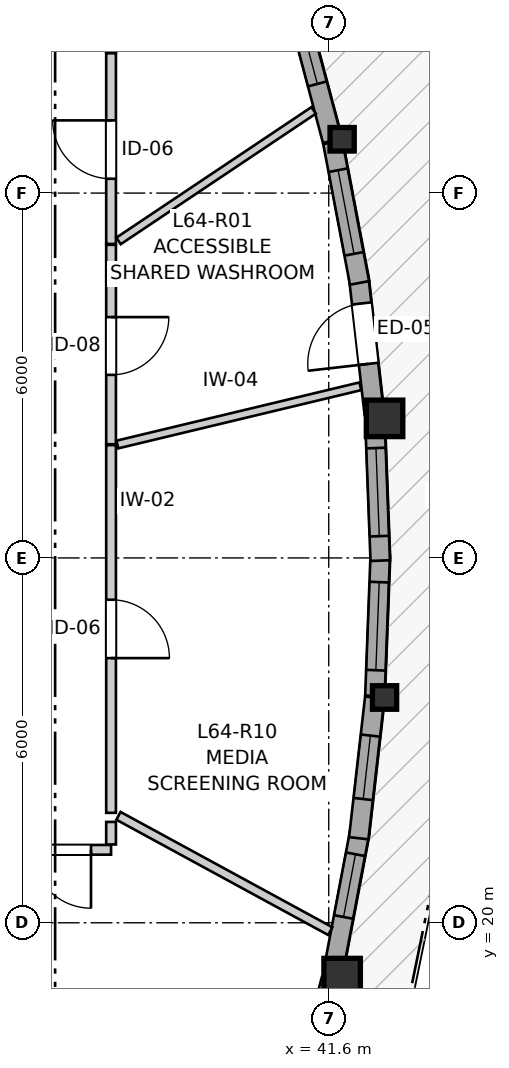
"""IFC4 building model, lengths in metres.
Left out: names, types, materials, properties, quantities, classifications, styles, units other than length and angle.
Written with IfcOpenShell. Run it as: python <this file> out.ifc"""

import sys

from ifc_helpers import new_model, si_unit, direction, frame, frame_2d, origin, origin_2d, place, context, subcontext, project, spatial, rectangle, i_section, extrude, source, transform, mapped, element, fill, save


model = new_model("IFC4")
c1 = context("Model", 3, precision=1e-05, world=origin(), true_north=direction((0.0, 1.0)))
c2 = subcontext(c1, "Body", "Model", "MODEL_VIEW")
j1 = project(units=[si_unit("LENGTHUNIT", "METRE"), si_unit("PLANEANGLEUNIT", "RADIAN")], contexts=[c1])
p1 = place(None, origin())
s1 = spatial("IfcSite", under=j1, at=p1, CompositionType="ELEMENT")
p2 = place(p1, origin())
s2 = spatial("IfcBuilding", under=s1, at=p2, CompositionType="ELEMENT")
p3 = place(p2, frame((0.0, 0.0, 214.8)))
s3 = spatial("IfcBuildingStorey", under=s2, at=p3, CompositionType="ELEMENT", Elevation=214.8)
m1 = source(origin(), c2, "Body", "SweptSolid", [
    extrude(rectangle(XDim=0.6, YDim=0.6, at=origin_2d()), origin(), (0.0, 0.0, 1.0), 2.96),
])
p4 = place(p3, frame((41.82, 19.115, 0.0), z_axis=(0.0, 0.0, 1.0), x_axis=(1.0, 0.0, 0.0)))
e1 = element("IfcColumn", 1, at=p4, inside=s3, PredefinedType="COLUMN", context=c2, shape_type="MappedRepresentation", body=[
    mapped(m1, transform((0.0, 0.0, 0.0), x_axis=(1.0, 0.0, 0.0), y_axis=(0.0, 1.0, 0.0), z_axis=(0.0, 0.0, 1.0), scale=1.0)),
])
m2 = source(origin(), c2, "Body", "SweptSolid", [
    extrude(i_section(OverallWidth=0.398, OverallDepth=0.387, WebThickness=0.019, FlangeThickness=0.03, FilletRadius=0.015, at=origin_2d()), origin(), (0.0, 0.0, 1.0), 2.96),
])
p5 = place(p3, frame((42.518, 23.705, 0.0), z_axis=(0.0, 0.0, 1.0), x_axis=(1.0, 0.0, 0.0)))
e2 = element("IfcColumn", 2, at=p5, inside=s3, PredefinedType="PILASTER", context=c2, shape_type="MappedRepresentation", body=[
    mapped(m2, transform((0.0, 0.0, 0.0), x_axis=(1.0, 0.0, 0.0), y_axis=(0.0, 1.0, 0.0), z_axis=(0.0, 0.0, 1.0), scale=1.0)),
])
p6 = place(p3, frame((42.518, 28.295, 0.0), z_axis=(0.0, 0.0, 1.0), x_axis=(1.0, 0.0, 0.0)))
e3 = element("IfcColumn", 3, at=p6, inside=s3, PredefinedType="COLUMN", context=c2, shape_type="MappedRepresentation", body=[
    mapped(m1, transform((0.0, 0.0, 0.0), x_axis=(1.0, 0.0, 0.0), y_axis=(0.0, 1.0, 0.0), z_axis=(0.0, 0.0, 1.0), scale=1.0)),
])
p7 = place(p3, frame((41.82, 32.885, 0.0), z_axis=(0.0, 0.0, 1.0), x_axis=(1.0, 0.0, 0.0)))
e4 = element("IfcColumn", 4, at=p7, inside=s3, PredefinedType="PILASTER", context=c2, shape_type="MappedRepresentation", body=[
    mapped(m2, transform((0.0, 0.0, 0.0), x_axis=(1.0, 0.0, 0.0), y_axis=(0.0, 1.0, 0.0), z_axis=(0.0, 0.0, 1.0), scale=1.0)),
])
p8 = place(p3, frame((41.045, 16.824, 0.0), z_axis=(0.0, 0.0, 1.0), x_axis=(0.257099982868, 0.966384808867, 0.0)))
e5 = element("IfcWall", 5, at=p8, inside=s3, PredefinedType="SOLIDWALL", context=c2, shape_type="SweptSolid", body=[
    extrude(rectangle(XDim=2.323, YDim=0.32, at=frame_2d((1.161, 0.0))), origin(), (0.0, 0.0, 1.0), 2.58),
])
p9 = place(p8, frame((0.491, 0.0, 0.82)))
e6 = element("IfcOpeningElement", 6, at=p9, cuts=e5, PredefinedType="OPENING", context=c2, shape_type="SweptSolid", body=[
    extrude(rectangle(XDim=1.35, YDim=1.45, at=frame_2d((0.675, 0.725))), frame((0.0, 0.17, 0.0), z_axis=(0.0, -1.0, 0.0), x_axis=(1.0, 0.0, 0.0)), (0.0, 0.0, 1.0), 0.34),
])
p10 = place(p3, frame((41.68, 19.233, 0.0), z_axis=(0.0, 0.0, 1.0), x_axis=(0.186630727552, 0.982430135701, 0.0)))
e7 = element("IfcWall", 7, at=p10, inside=s3, PredefinedType="SOLIDWALL", context=c2, shape_type="SweptSolid", body=[
    extrude(rectangle(XDim=2.284, YDim=0.32, at=frame_2d((1.142, 0.0))), origin(), (0.0, 0.0, 1.0), 2.58),
])
p11 = place(p10, frame((0.878, 0.0, 0.82)))
e8 = element("IfcOpeningElement", 8, at=p11, cuts=e7, PredefinedType="OPENING", context=c2, shape_type="SweptSolid", body=[
    extrude(rectangle(XDim=1.05, YDim=1.45, at=frame_2d((0.525, 0.725))), frame((0.0, 0.17, 0.0), z_axis=(0.0, -1.0, 0.0), x_axis=(1.0, 0.0, 0.0)), (0.0, 0.0, 1.0), 0.34),
])
p12 = place(p3, frame((42.093, 21.39, 0.0), z_axis=(0.0, 0.0, 1.0), x_axis=(0.113262644001, 0.993565082656, 0.0)))
e9 = element("IfcWall", 9, at=p12, inside=s3, PredefinedType="SOLIDWALL", context=c2, shape_type="SweptSolid", body=[
    extrude(rectangle(XDim=2.328, YDim=0.32, at=frame_2d((1.164, 0.0))), origin(), (0.0, 0.0, 1.0), 2.58),
])
p13 = place(p12, frame((0.649, 0.0, 0.82)))
e10 = element("IfcOpeningElement", 10, at=p13, cuts=e9, PredefinedType="OPENING", context=c2, shape_type="SweptSolid", body=[
    extrude(rectangle(XDim=1.05, YDim=1.45, at=frame_2d((0.525, 0.725))), frame((0.0, 0.17, 0.0), z_axis=(0.0, -1.0, 0.0), x_axis=(1.0, 0.0, 0.0)), (0.0, 0.0, 1.0), 0.34),
])
p14 = place(p3, frame((42.359, 23.731, 0.0), z_axis=(0.0, 0.0, 1.0), x_axis=(0.037975332386, 0.999278676912, 0.0)))
e11 = element("IfcWall", 11, at=p14, inside=s3, PredefinedType="SOLIDWALL", context=c2, shape_type="SweptSolid", body=[
    extrude(rectangle(XDim=2.314, YDim=0.32, at=frame_2d((1.157, 0.0))), origin(), (0.0, 0.0, 1.0), 2.58),
])
p15 = place(p14, frame((0.422, 0.0, 0.82)))
e12 = element("IfcOpeningElement", 12, at=p15, cuts=e11, PredefinedType="OPENING", context=c2, shape_type="SweptSolid", body=[
    extrude(rectangle(XDim=1.45, YDim=1.25, at=frame_2d((0.725, 0.625))), frame((0.0, 0.17, 0.0), z_axis=(0.0, -1.0, 0.0), x_axis=(1.0, 0.0, 0.0)), (0.0, 0.0, 1.0), 0.34),
])
p16 = place(p3, frame((42.447, 25.956, 0.0), z_axis=(0.0, 0.0, 1.0), x_axis=(-0.037961080573, 0.999279218418, 0.0)))
e13 = element("IfcWall", 13, at=p16, inside=s3, PredefinedType="SOLIDWALL", context=c2, shape_type="SweptSolid", body=[
    extrude(rectangle(XDim=2.245, YDim=0.32, at=frame_2d((1.122, 0.0))), origin(), (0.0, 0.0, 1.0), 2.58),
])
p17 = place(p16, frame((0.402, 0.0, 0.82)))
e14 = element("IfcOpeningElement", 14, at=p17, cuts=e13, PredefinedType="OPENING", context=c2, shape_type="SweptSolid", body=[
    extrude(rectangle(XDim=1.45, YDim=1.25, at=frame_2d((0.725, 0.625))), frame((0.0, 0.17, 0.0), z_axis=(0.0, -1.0, 0.0), x_axis=(1.0, 0.0, 0.0)), (0.0, 0.0, 1.0), 0.34),
])
p18 = place(p3, frame((42.349, 28.366, 0.0), z_axis=(0.0, 0.0, 1.0), x_axis=(-0.113314829757, 0.99355913229, 0.0)))
e15 = element("IfcWall", 15, at=p18, inside=s3, PredefinedType="SOLIDWALL", context=c2, shape_type="SweptSolid", body=[
    extrude(rectangle(XDim=2.258, YDim=0.32, at=frame_2d((1.129, 0.0))), origin(), (0.0, 0.0, 1.0), 2.58),
])
p19 = place(p18, frame((0.83, 0.0, 0.0)))
e16 = element("IfcOpeningElement", 16, at=p19, cuts=e15, PredefinedType="OPENING", context=c2, shape_type="SweptSolid", body=[
    extrude(rectangle(XDim=1.0, YDim=2.1, at=frame_2d((0.5, 1.05))), frame((0.0, 0.17, 0.0), z_axis=(0.0, -1.0, 0.0), x_axis=(1.0, 0.0, 0.0)), (0.0, 0.0, 1.0), 0.34),
])
p20 = place(p3, frame((42.106, 30.523, 0.0), z_axis=(0.0, 0.0, 1.0), x_axis=(-0.186673658051, 0.982421979289, 0.0)))
e17 = element("IfcWall", 17, at=p20, inside=s3, PredefinedType="SOLIDWALL", context=c2, shape_type="SweptSolid", body=[
    extrude(rectangle(XDim=2.354, YDim=0.32, at=frame_2d((1.177, 0.0))), origin(), (0.0, 0.0, 1.0), 2.58),
])
p21 = place(p20, frame((0.487, 0.0, 0.82)))
e18 = element("IfcOpeningElement", 18, at=p21, cuts=e17, PredefinedType="OPENING", context=c2, shape_type="SweptSolid", body=[
    extrude(rectangle(XDim=1.4, YDim=1.35, at=frame_2d((0.7, 0.675))), frame((0.0, 0.17, 0.0), z_axis=(0.0, -1.0, 0.0), x_axis=(1.0, 0.0, 0.0)), (0.0, 0.0, 1.0), 0.34),
])
p22 = place(p3, frame((41.66, 32.863, 0.0), z_axis=(0.0, 0.0, 1.0), x_axis=(-0.257008511659, 0.966409139513, 0.0)))
e19 = element("IfcWall", 19, at=p22, inside=s3, PredefinedType="SOLIDWALL", context=c2, shape_type="SweptSolid", body=[
    extrude(rectangle(XDim=2.393, YDim=0.32, at=frame_2d((1.196, 0.0))), origin(), (0.0, 0.0, 1.0), 2.58),
])
p23 = place(p22, frame((0.965, 0.0, 0.82)))
e20 = element("IfcOpeningElement", 20, at=p23, cuts=e19, PredefinedType="OPENING", context=c2, shape_type="SweptSolid", body=[
    extrude(rectangle(XDim=0.95, YDim=1.35, at=frame_2d((0.475, 0.675))), frame((0.0, 0.17, 0.0), z_axis=(0.0, -1.0, 0.0), x_axis=(1.0, 0.0, 0.0)), (0.0, 0.0, 1.0), 0.34),
])
p24 = place(p3, frame((38.02, 27.855, 0.0), z_axis=(0.0, 0.0, 1.0), x_axis=(0.0, -1.0, 0.0)))
e21 = element("IfcWall", 21, at=p24, inside=s3, PredefinedType="PARTITIONING", context=c2, shape_type="SweptSolid", body=[
    extrude(rectangle(XDim=6.047, YDim=0.16, at=frame_2d((3.023, 0.0))), origin(), (0.0, 0.0, 1.0), 2.96),
])
p25 = place(p24, frame((2.542, 0.0, 0.0)))
e22 = element("IfcOpeningElement", 22, at=p25, cuts=e21, PredefinedType="OPENING", context=c2, shape_type="SweptSolid", body=[
    extrude(rectangle(XDim=0.96, YDim=2.1, at=frame_2d((0.48, 1.05))), frame((0.0, 0.09, 0.0), z_axis=(0.0, -1.0, 0.0), x_axis=(1.0, 0.0, 0.0)), (0.0, 0.0, 1.0), 0.18),
])
p26 = place(p3, frame((38.02, 31.149, 0.0), z_axis=(0.0, 0.0, 1.0), x_axis=(0.0, -1.0, 0.0)))
e23 = element("IfcWall", 23, at=p26, inside=s3, PredefinedType="PARTITIONING", context=c2, shape_type="SweptSolid", body=[
    extrude(rectangle(XDim=3.279, YDim=0.16, at=frame_2d((1.639, 0.0))), origin(), (0.0, 0.0, 1.0), 2.628),
])
p27 = place(p26, frame((1.188, 0.0, 0.0)))
e24 = element("IfcOpeningElement", 24, at=p27, cuts=e23, PredefinedType="OPENING", context=c2, shape_type="SweptSolid", body=[
    extrude(rectangle(XDim=0.95, YDim=2.1, at=frame_2d((0.475, 1.05))), frame((0.0, 0.09, 0.0), z_axis=(0.0, -1.0, 0.0), x_axis=(1.0, 0.0, 0.0)), (0.0, 0.0, 1.0), 0.18),
])
p28 = place(p3, frame((38.02, 31.164, 0.0), z_axis=(0.0, 0.0, 1.0), x_axis=(0.0, 1.0, 0.0)))
e25 = element("IfcWall", 25, at=p28, inside=s3, PredefinedType="PARTITIONING", context=c2, shape_type="SweptSolid", body=[
    extrude(rectangle(XDim=3.136, YDim=0.16, at=frame_2d((1.568, 0.0))), origin(), (0.0, 0.0, 1.0), 2.628),
])
p29 = place(p28, frame((1.072, 0.0, 0.0)))
e26 = element("IfcOpeningElement", 26, at=p29, cuts=e25, PredefinedType="OPENING", context=c2, shape_type="SweptSolid", body=[
    extrude(rectangle(XDim=0.96, YDim=2.1, at=frame_2d((0.48, 1.05))), frame((0.0, 0.09, 0.0), z_axis=(0.0, -1.0, 0.0), x_axis=(1.0, 0.0, 0.0)), (0.0, 0.0, 1.0), 0.18),
])
p30 = place(p3, frame((38.02, 21.2, 0.0), z_axis=(0.0, 0.0, 1.0), x_axis=(-1.0, 0.0, 0.0)))
e27 = element("IfcWall", 27, at=p30, inside=s3, PredefinedType="PARTITIONING", context=c2, shape_type="SweptSolid", body=[
    extrude(rectangle(XDim=1.612, YDim=0.16, at=frame_2d((0.806, 0.0))), origin(), (0.0, 0.0, 1.0), 2.96),
])
p31 = place(p30, frame((0.33, 0.0, 0.0)))
e28 = element("IfcOpeningElement", 28, at=p31, cuts=e27, PredefinedType="OPENING", context=c2, shape_type="SweptSolid", body=[
    extrude(rectangle(XDim=0.96, YDim=2.1, at=frame_2d((0.48, 1.05))), frame((0.0, 0.09, 0.0), z_axis=(0.0, -1.0, 0.0), x_axis=(1.0, 0.0, 0.0)), (0.0, 0.0, 1.0), 0.18),
])
p32 = place(p3, frame((38.123, 27.865, 0.0), z_axis=(0.0, 0.0, 1.0), x_axis=(0.972444961782, 0.233132572379, 0.0)))
e29 = element("IfcWall", 29, at=p32, inside=s3, PredefinedType="PARTITIONING", context=c2, shape_type="SweptSolid", body=[
    extrude(rectangle(XDim=4.11, YDim=0.13, at=frame_2d((2.055, 0.0))), origin(), (0.0, 0.0, 1.0), 2.96),
])
p33 = place(p3, frame((38.142, 21.759, 0.0), z_axis=(0.0, 0.0, 1.0), x_axis=(0.878323390095, -0.478066964359, 0.0)))
e30 = element("IfcWall", 30, at=p33, inside=s3, PredefinedType="PARTITIONING", context=c2, shape_type="SweptSolid", body=[
    extrude(rectangle(XDim=3.966, YDim=0.145, at=frame_2d((1.983, 0.0))), origin(), (0.0, 0.0, 1.0), 2.96),
])
p34 = place(p3, frame((38.143, 31.213, 0.0), z_axis=(0.0, 0.0, 1.0), x_axis=(0.831154063558, 0.556042195009, 0.0)))
e31 = element("IfcWall", 31, at=p34, inside=s3, PredefinedType="PARTITIONING", context=c2, shape_type="SweptSolid", body=[
    extrude(rectangle(XDim=3.86, YDim=0.13, at=frame_2d((1.93, 0.0))), origin(), (0.0, 0.0, 1.0), 2.96),
])
p35 = place(p3, frame((38.02, 21.288, 0.0), z_axis=(0.0, 0.0, 1.0), x_axis=(0.0, 1.0, 0.0)))
e32 = element("IfcWall", 32, at=p35, inside=s3, PredefinedType="PARTITIONING", context=c2, shape_type="SweptSolid", body=[
    extrude(rectangle(XDim=0.371, YDim=0.16, at=frame_2d((0.186, 0.0))), origin(), (0.0, 0.0, 1.0), 2.96),
])
m3 = source(origin(), c2, "Body", "SweptSolid", [
    extrude(rectangle(XDim=1.05, YDim=1.45, at=frame_2d((0.525, 0.725))), frame((0.0, 0.03, 0.0), z_axis=(0.0, -1.0, 0.0), x_axis=(1.0, 0.0, 0.0)), (0.0, 0.0, 1.0), 0.06),
])
p36 = place(p11, origin())
e33 = element("IfcWindow", 33, at=p36, inside=s3, PartitioningType="SINGLE_PANEL", PredefinedType="WINDOW", context=c2, shape_type="MappedRepresentation", body=[
    mapped(m3, transform((0.0, 0.0, 0.0), x_axis=(1.0, 0.0, 0.0), y_axis=(0.0, 1.0, 0.0), z_axis=(0.0, 0.0, 1.0), scale=1.0)),
])
fill(e8, e33)
p37 = place(p13, origin())
e34 = element("IfcWindow", 34, at=p37, inside=s3, PartitioningType="SINGLE_PANEL", PredefinedType="WINDOW", context=c2, shape_type="MappedRepresentation", body=[
    mapped(m3, transform((0.0, 0.0, 0.0), x_axis=(1.0, 0.0, 0.0), y_axis=(0.0, 1.0, 0.0), z_axis=(0.0, 0.0, 1.0), scale=1.0)),
])
fill(e10, e34)
m4 = source(origin(), c2, "Body", "SweptSolid", [
    extrude(rectangle(XDim=1.45, YDim=1.25, at=frame_2d((0.725, 0.625))), frame((0.0, 0.03, 0.0), z_axis=(0.0, -1.0, 0.0), x_axis=(1.0, 0.0, 0.0)), (0.0, 0.0, 1.0), 0.06),
])
p38 = place(p15, origin())
e35 = element("IfcWindow", 35, at=p38, inside=s3, PartitioningType="SINGLE_PANEL", PredefinedType="WINDOW", context=c2, shape_type="MappedRepresentation", body=[
    mapped(m4, transform((0.0, 0.0, 0.0), x_axis=(1.0, 0.0, 0.0), y_axis=(0.0, 1.0, 0.0), z_axis=(0.0, 0.0, 1.0), scale=1.0)),
])
fill(e12, e35)
p39 = place(p17, origin())
e36 = element("IfcWindow", 36, at=p39, inside=s3, PartitioningType="SINGLE_PANEL", PredefinedType="WINDOW", context=c2, shape_type="MappedRepresentation", body=[
    mapped(m4, transform((0.0, 0.0, 0.0), x_axis=(1.0, 0.0, 0.0), y_axis=(0.0, 1.0, 0.0), z_axis=(0.0, 0.0, 1.0), scale=1.0)),
])
fill(e14, e36)
m5 = source(origin(), c2, "Body", "SweptSolid", [
    extrude(rectangle(XDim=1.0, YDim=2.1, at=frame_2d((0.5, 1.05))), frame((0.0, 0.025, 0.0), z_axis=(0.0, -1.0, 0.0), x_axis=(1.0, 0.0, 0.0)), (0.0, 0.0, 1.0), 0.05),
])
p40 = place(p19, origin())
e37 = element("IfcDoor", 37, at=p40, inside=s3, OperationType="SINGLE_SWING_LEFT", PredefinedType="DOOR", context=c2, shape_type="MappedRepresentation", body=[
    mapped(m5, transform((0.0, 0.0, 0.0), x_axis=(1.0, 0.0, 0.0), y_axis=(0.0, 1.0, 0.0), z_axis=(0.0, 0.0, 1.0), scale=1.0)),
])
fill(e16, e37)
m6 = source(origin(), c2, "Body", "SweptSolid", [
    extrude(rectangle(XDim=1.4, YDim=1.35, at=frame_2d((0.7, 0.675))), frame((0.0, 0.03, 0.0), z_axis=(0.0, -1.0, 0.0), x_axis=(1.0, 0.0, 0.0)), (0.0, 0.0, 1.0), 0.06),
])
p41 = place(p21, origin())
e38 = element("IfcWindow", 38, at=p41, inside=s3, PartitioningType="SINGLE_PANEL", PredefinedType="WINDOW", context=c2, shape_type="MappedRepresentation", body=[
    mapped(m6, transform((0.0, 0.0, 0.0), x_axis=(1.0, 0.0, 0.0), y_axis=(0.0, 1.0, 0.0), z_axis=(0.0, 0.0, 1.0), scale=1.0)),
])
fill(e18, e38)
m7 = source(origin(), c2, "Body", "SweptSolid", [
    extrude(rectangle(XDim=0.95, YDim=1.35, at=frame_2d((0.475, 0.675))), frame((0.0, 0.03, 0.0), z_axis=(0.0, -1.0, 0.0), x_axis=(1.0, 0.0, 0.0)), (0.0, 0.0, 1.0), 0.06),
])
p42 = place(p23, origin())
e39 = element("IfcWindow", 39, at=p42, inside=s3, PartitioningType="SINGLE_PANEL", PredefinedType="WINDOW", context=c2, shape_type="MappedRepresentation", body=[
    mapped(m7, transform((0.0, 0.0, 0.0), x_axis=(1.0, 0.0, 0.0), y_axis=(0.0, 1.0, 0.0), z_axis=(0.0, 0.0, 1.0), scale=1.0)),
])
fill(e20, e39)
m8 = source(origin(), c2, "Body", "SweptSolid", [
    extrude(rectangle(XDim=0.96, YDim=2.1, at=frame_2d((0.48, 1.05))), frame((0.0, 0.025, 0.0), z_axis=(0.0, -1.0, 0.0), x_axis=(1.0, 0.0, 0.0)), (0.0, 0.0, 1.0), 0.05),
])
p43 = place(p25, origin())
e40 = element("IfcDoor", 40, at=p43, inside=s3, OperationType="SINGLE_SWING_RIGHT", PredefinedType="DOOR", context=c2, shape_type="MappedRepresentation", body=[
    mapped(m8, transform((0.0, 0.0, 0.0), x_axis=(1.0, 0.0, 0.0), y_axis=(0.0, 1.0, 0.0), z_axis=(0.0, 0.0, 1.0), scale=1.0)),
])
fill(e22, e40)
m9 = source(origin(), c2, "Body", "SweptSolid", [
    extrude(rectangle(XDim=0.95, YDim=2.1, at=frame_2d((0.475, 1.05))), frame((0.0, 0.025, 0.0), z_axis=(0.0, -1.0, 0.0), x_axis=(1.0, 0.0, 0.0)), (0.0, 0.0, 1.0), 0.05),
])
p44 = place(p27, origin())
e41 = element("IfcDoor", 41, at=p44, inside=s3, OperationType="SINGLE_SWING_LEFT", PredefinedType="DOOR", context=c2, shape_type="MappedRepresentation", body=[
    mapped(m9, transform((0.0, 0.0, 0.0), x_axis=(1.0, 0.0, 0.0), y_axis=(0.0, 1.0, 0.0), z_axis=(0.0, 0.0, 1.0), scale=1.0)),
])
fill(e24, e41)
p45 = place(p29, origin())
e42 = element("IfcDoor", 42, at=p45, inside=s3, OperationType="SINGLE_SWING_RIGHT", PredefinedType="DOOR", context=c2, shape_type="MappedRepresentation", body=[
    mapped(m8, transform((0.0, 0.0, 0.0), x_axis=(1.0, 0.0, 0.0), y_axis=(0.0, 1.0, 0.0), z_axis=(0.0, 0.0, 1.0), scale=1.0)),
])
fill(e26, e42)
p46 = place(p31, origin())
e43 = element("IfcDoor", 43, at=p46, inside=s3, OperationType="SINGLE_SWING_LEFT", PredefinedType="DOOR", context=c2, shape_type="MappedRepresentation", body=[
    mapped(m8, transform((0.0, 0.0, 0.0), x_axis=(1.0, 0.0, 0.0), y_axis=(0.0, 1.0, 0.0), z_axis=(0.0, 0.0, 1.0), scale=1.0)),
])
fill(e28, e43)
save(model, sys.argv[1])
